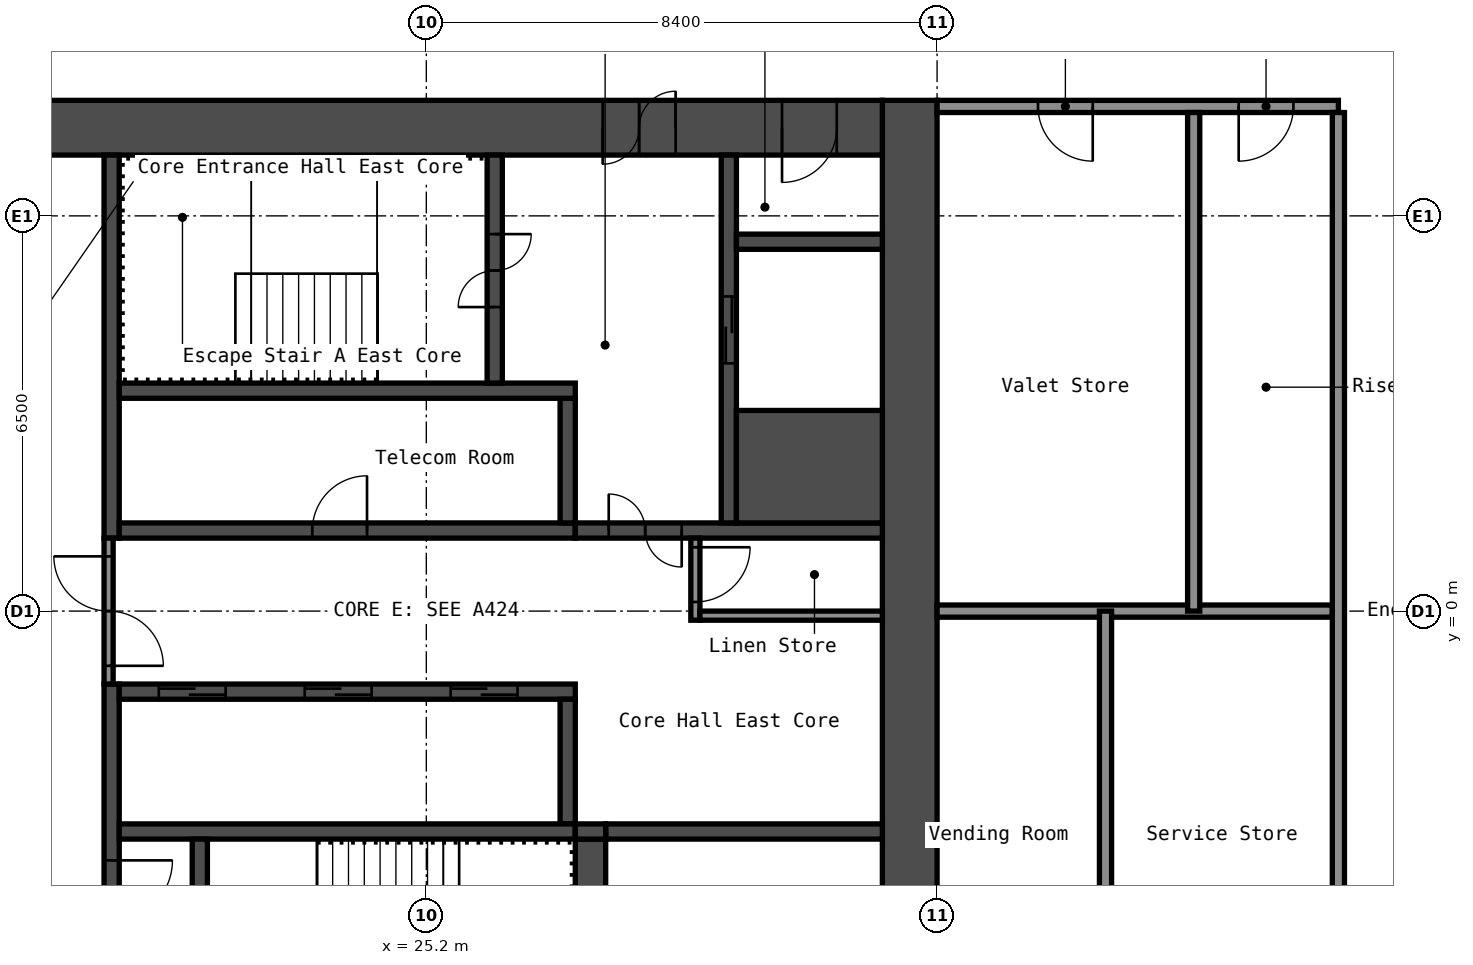
"""IFC4 building model, lengths in metres.
Left out: names, types, materials, properties, quantities, classifications, styles, units other than length and angle.
Written with IfcOpenShell. Run it as: python <this file> out.ifc"""

import sys

from ifc_helpers import new_model, si_unit, direction, frame, frame_2d, origin, place, context, subcontext, project, spatial, rectangle, extrude, element, fill, save


model = new_model("IFC4")
c1 = context("Model", 3, precision=1e-05, world=origin(), true_north=direction((0.0, 1.0)))
c2 = subcontext(c1, "Body", "Model", "MODEL_VIEW")
j1 = project(units=[si_unit("LENGTHUNIT", "METRE"), si_unit("PLANEANGLEUNIT", "RADIAN")], contexts=[c1])
p1 = place(None, origin())
s1 = spatial("IfcSite", under=j1, at=p1, CompositionType="ELEMENT")
p2 = place(p1, origin())
s2 = spatial("IfcBuilding", under=s1, at=p2, CompositionType="ELEMENT")
p3 = place(p2, frame((0.0, 0.0, 166.2)))
s3 = spatial("IfcBuildingStorey", under=s2, at=p3, CompositionType="ELEMENT", Elevation=166.2)
p4 = place(p3, frame((33.15, -8.4, 0.0), z_axis=(0.0, 0.0, 1.0), x_axis=(0.0, 1.0, 0.0)))
e1 = element("IfcWall", 1, at=p4, inside=s3, PredefinedType="SHEAR", context=c2, shape_type="SweptSolid", body=[
    extrude(rectangle(XDim=16.8, YDim=0.9, at=frame_2d((8.4, 0.0))), origin(), (0.0, 0.0, 1.0), 2.75),
])
p5 = place(p3, frame((17.7, 7.95, 0.0), z_axis=(0.0, 0.0, 1.0), x_axis=(1.0, 0.0, 0.0)))
e2 = element("IfcWall", 2, at=p5, inside=s3, PredefinedType="SHEAR", context=c2, shape_type="SweptSolid", body=[
    extrude(rectangle(XDim=15.0, YDim=0.9, at=frame_2d((7.5, 0.0))), origin(), (0.0, 0.0, 1.0), 2.75),
])
p6 = place(p5, frame((10.4, 0.0, 0.0)))
e3 = element("IfcOpeningElement", 3, at=p6, cuts=e2, PredefinedType="OPENING", context=c2, shape_type="SweptSolid", body=[
    extrude(rectangle(XDim=1.2, YDim=2.1, at=frame_2d((0.6, 1.05))), frame((0.0, 0.46, 0.0), z_axis=(0.0, -1.0, 0.0), x_axis=(1.0, 0.0, 0.0)), (0.0, 0.0, 1.0), 0.92),
])
p7 = place(p5, frame((13.35, 0.0, 0.0)))
e4 = element("IfcOpeningElement", 4, at=p7, cuts=e2, PredefinedType="OPENING", context=c2, shape_type="SweptSolid", body=[
    extrude(rectangle(XDim=0.9, YDim=2.1, at=frame_2d((0.45, 1.05))), frame((0.0, 0.46, 0.0), z_axis=(0.0, -1.0, 0.0), x_axis=(1.0, 0.0, 0.0)), (0.0, 0.0, 1.0), 0.92),
])
p8 = place(p3, frame((20.025, 1.2, 0.0), z_axis=(0.0, 0.0, 1.0), x_axis=(0.0, 1.0, 0.0)))
e5 = element("IfcWall", 5, at=p8, inside=s3, PredefinedType="SHEAR", context=c2, shape_type="SweptSolid", body=[
    extrude(rectangle(XDim=6.3, YDim=0.25, at=frame_2d((3.15, 0.0))), origin(), (0.0, 0.0, 1.0), 2.75),
])
p9 = place(p3, frame((20.025, -7.5, 0.0), z_axis=(0.0, 0.0, 1.0), x_axis=(0.0, 1.0, 0.0)))
e6 = element("IfcWall", 6, at=p9, inside=s3, PredefinedType="SHEAR", context=c2, shape_type="SweptSolid", body=[
    extrude(rectangle(XDim=6.3, YDim=0.25, at=frame_2d((3.15, 0.0))), origin(), (0.0, 0.0, 1.0), 2.75),
])
p10 = place(p9, frame((2.4, 0.0, 0.0)))
e7 = element("IfcOpeningElement", 7, at=p10, cuts=e6, PredefinedType="OPENING", context=c2, shape_type="SweptSolid", body=[
    extrude(rectangle(XDim=1.0, YDim=2.1, at=frame_2d((0.5, 1.05))), frame((0.0, 0.135, 0.0), z_axis=(0.0, -1.0, 0.0), x_axis=(1.0, 0.0, 0.0)), (0.0, 0.0, 1.0), 0.27),
])
p11 = place(p3, frame((20.15, 1.325, 0.0), z_axis=(0.0, 0.0, 1.0), x_axis=(1.0, 0.0, 0.0)))
e8 = element("IfcWall", 8, at=p11, inside=s3, PredefinedType="SHEAR", context=c2, shape_type="SweptSolid", body=[
    extrude(rectangle(XDim=7.5, YDim=0.25, at=frame_2d((3.75, 0.0))), origin(), (0.0, 0.0, 1.0), 2.75),
])
p12 = place(p11, frame((3.175, 0.0, 0.0)))
e9 = element("IfcOpeningElement", 9, at=p12, cuts=e8, PredefinedType="OPENING", context=c2, shape_type="SweptSolid", body=[
    extrude(rectangle(XDim=0.9, YDim=2.1, at=frame_2d((0.45, 1.05))), frame((0.0, 0.135, 0.0), z_axis=(0.0, -1.0, 0.0), x_axis=(1.0, 0.0, 0.0)), (0.0, 0.0, 1.0), 0.27),
])
p13 = place(p3, frame((27.525, 1.45, 0.0), z_axis=(0.0, 0.0, 1.0), x_axis=(0.0, 1.0, 0.0)))
e10 = element("IfcWall", 10, at=p13, inside=s3, PredefinedType="SHEAR", context=c2, shape_type="SweptSolid", body=[
    extrude(rectangle(XDim=2.05, YDim=0.25, at=frame_2d((1.025, 0.0))), origin(), (0.0, 0.0, 1.0), 2.75),
])
p14 = place(p3, frame((20.15, 3.625, 0.0), z_axis=(0.0, 0.0, 1.0), x_axis=(1.0, 0.0, 0.0)))
e11 = element("IfcWall", 11, at=p14, inside=s3, PredefinedType="SHEAR", context=c2, shape_type="SweptSolid", body=[
    extrude(rectangle(XDim=7.5, YDim=0.25, at=frame_2d((3.75, 0.0))), origin(), (0.0, 0.0, 1.0), 2.75),
])
p15 = place(p3, frame((26.325, 3.75, 0.0), z_axis=(0.0, 0.0, 1.0), x_axis=(0.0, 1.0, 0.0)))
e12 = element("IfcWall", 12, at=p15, inside=s3, PredefinedType="SHEAR", context=c2, shape_type="SweptSolid", body=[
    extrude(rectangle(XDim=3.75, YDim=0.25, at=frame_2d((1.875, 0.0))), origin(), (0.0, 0.0, 1.0), 2.75),
])
p16 = place(p15, frame((1.25, 0.0, 0.0)))
e13 = element("IfcOpeningElement", 13, at=p16, cuts=e12, PredefinedType="OPENING", context=c2, shape_type="SweptSolid", body=[
    extrude(rectangle(XDim=1.2, YDim=2.1, at=frame_2d((0.6, 1.05))), frame((0.0, 0.135, 0.0), z_axis=(0.0, -1.0, 0.0), x_axis=(1.0, 0.0, 0.0)), (0.0, 0.0, 1.0), 0.27),
])
p17 = place(p3, frame((27.65, 1.325, 0.0), z_axis=(0.0, 0.0, 1.0), x_axis=(1.0, 0.0, 0.0)))
e14 = element("IfcWall", 14, at=p17, inside=s3, PredefinedType="SHEAR", context=c2, shape_type="SweptSolid", body=[
    extrude(rectangle(XDim=5.05, YDim=0.25, at=frame_2d((2.525, 0.0))), origin(), (0.0, 0.0, 1.0), 2.75),
])
p18 = place(p17, frame((0.55, 0.0, 0.0)))
e15 = element("IfcOpeningElement", 15, at=p18, cuts=e14, PredefinedType="OPENING", context=c2, shape_type="SweptSolid", body=[
    extrude(rectangle(XDim=1.2, YDim=2.1, at=frame_2d((0.6, 1.05))), frame((0.0, 0.135, 0.0), z_axis=(0.0, -1.0, 0.0), x_axis=(1.0, 0.0, 0.0)), (0.0, 0.0, 1.0), 0.27),
])
p19 = place(p3, frame((30.175, 1.45, 0.0), z_axis=(0.0, 0.0, 1.0), x_axis=(0.0, 1.0, 0.0)))
e16 = element("IfcWall", 16, at=p19, inside=s3, PredefinedType="SHEAR", context=c2, shape_type="SweptSolid", body=[
    extrude(rectangle(XDim=6.05, YDim=0.25, at=frame_2d((3.025, 0.0))), origin(), (0.0, 0.0, 1.0), 2.75),
])
p20 = place(p19, frame((2.625, 0.0, 0.0)))
e17 = element("IfcOpeningElement", 17, at=p20, cuts=e16, PredefinedType="OPENING", context=c2, shape_type="SweptSolid", body=[
    extrude(rectangle(XDim=1.1, YDim=2.1, at=frame_2d((0.55, 1.05))), frame((0.0, 0.135, 0.0), z_axis=(0.0, -1.0, 0.0), x_axis=(1.0, 0.0, 0.0)), (0.0, 0.0, 1.0), 0.27),
])
p21 = place(p3, frame((30.3, 2.375, 0.0), z_axis=(0.0, 0.0, 1.0), x_axis=(1.0, 0.0, 0.0)))
e18 = element("IfcWall", 18, at=p21, inside=s3, PredefinedType="SHEAR", context=c2, shape_type="SweptSolid", body=[
    extrude(rectangle(XDim=2.4, YDim=1.85, at=frame_2d((1.2, 0.0))), origin(), (0.0, 0.0, 1.0), 2.75),
])
p22 = place(p3, frame((30.3, 6.075, 0.0), z_axis=(0.0, 0.0, 1.0), x_axis=(1.0, 0.0, 0.0)))
e19 = element("IfcWall", 19, at=p22, inside=s3, PredefinedType="SHEAR", context=c2, shape_type="SweptSolid", body=[
    extrude(rectangle(XDim=2.4, YDim=0.25, at=frame_2d((1.2, 0.0))), origin(), (0.0, 0.0, 1.0), 2.75),
])
p23 = place(p3, frame((20.15, -1.325, 0.0), z_axis=(0.0, 0.0, 1.0), x_axis=(1.0, 0.0, 0.0)))
e20 = element("IfcWall", 20, at=p23, inside=s3, PredefinedType="SHEAR", context=c2, shape_type="SweptSolid", body=[
    extrude(rectangle(XDim=7.5, YDim=0.25, at=frame_2d((3.75, 0.0))), origin(), (0.0, 0.0, 1.0), 2.75),
])
p24 = place(p23, frame((0.65, 0.0, 0.0)))
e21 = element("IfcOpeningElement", 21, at=p24, cuts=e20, PredefinedType="OPENING", context=c2, shape_type="SweptSolid", body=[
    extrude(rectangle(XDim=1.1, YDim=2.1, at=frame_2d((0.55, 1.05))), frame((0.0, 0.135, 0.0), z_axis=(0.0, -1.0, 0.0), x_axis=(1.0, 0.0, 0.0)), (0.0, 0.0, 1.0), 0.27),
])
p25 = place(p23, frame((3.05, 0.0, 0.0)))
e22 = element("IfcOpeningElement", 22, at=p25, cuts=e20, PredefinedType="OPENING", context=c2, shape_type="SweptSolid", body=[
    extrude(rectangle(XDim=1.1, YDim=2.1, at=frame_2d((0.55, 1.05))), frame((0.0, 0.135, 0.0), z_axis=(0.0, -1.0, 0.0), x_axis=(1.0, 0.0, 0.0)), (0.0, 0.0, 1.0), 0.27),
])
p26 = place(p23, frame((5.45, 0.0, 0.0)))
e23 = element("IfcOpeningElement", 23, at=p26, cuts=e20, PredefinedType="OPENING", context=c2, shape_type="SweptSolid", body=[
    extrude(rectangle(XDim=1.1, YDim=2.1, at=frame_2d((0.55, 1.05))), frame((0.0, 0.135, 0.0), z_axis=(0.0, -1.0, 0.0), x_axis=(1.0, 0.0, 0.0)), (0.0, 0.0, 1.0), 0.27),
])
p27 = place(p3, frame((27.525, -3.5, 0.0), z_axis=(0.0, 0.0, 1.0), x_axis=(0.0, 1.0, 0.0)))
e24 = element("IfcWall", 24, at=p27, inside=s3, PredefinedType="SHEAR", context=c2, shape_type="SweptSolid", body=[
    extrude(rectangle(XDim=2.05, YDim=0.25, at=frame_2d((1.025, 0.0))), origin(), (0.0, 0.0, 1.0), 2.75),
])
p28 = place(p3, frame((20.15, -3.625, 0.0), z_axis=(0.0, 0.0, 1.0), x_axis=(1.0, 0.0, 0.0)))
e25 = element("IfcWall", 25, at=p28, inside=s3, PredefinedType="SHEAR", context=c2, shape_type="SweptSolid", body=[
    extrude(rectangle(XDim=7.5, YDim=0.25, at=frame_2d((3.75, 0.0))), origin(), (0.0, 0.0, 1.0), 2.75),
])
p29 = place(p3, frame((21.475, -7.5, 0.0), z_axis=(0.0, 0.0, 1.0), x_axis=(0.0, 1.0, 0.0)))
e26 = element("IfcWall", 26, at=p29, inside=s3, PredefinedType="SHEAR", context=c2, shape_type="SweptSolid", body=[
    extrude(rectangle(XDim=3.75, YDim=0.25, at=frame_2d((1.875, 0.0))), origin(), (0.0, 0.0, 1.0), 2.75),
])
p30 = place(p29, frame((1.3, 0.0, 0.0)))
e27 = element("IfcOpeningElement", 27, at=p30, cuts=e26, PredefinedType="OPENING", context=c2, shape_type="SweptSolid", body=[
    extrude(rectangle(XDim=1.2, YDim=2.1, at=frame_2d((0.6, 1.05))), frame((0.0, 0.135, 0.0), z_axis=(0.0, -1.0, 0.0), x_axis=(1.0, 0.0, 0.0)), (0.0, 0.0, 1.0), 0.27),
])
p31 = place(p3, frame((27.9, -7.5, 0.0), z_axis=(0.0, 0.0, 1.0), x_axis=(0.0, 1.0, 0.0)))
e28 = element("IfcWall", 28, at=p31, inside=s3, PredefinedType="SHEAR", context=c2, shape_type="SweptSolid", body=[
    extrude(rectangle(XDim=3.75, YDim=0.5, at=frame_2d((1.875, 0.0))), origin(), (0.0, 0.0, 1.0), 2.75),
])
p32 = place(p3, frame((28.15, -3.625, 0.0), z_axis=(0.0, 0.0, 1.0), x_axis=(1.0, 0.0, 0.0)))
e29 = element("IfcWall", 29, at=p32, inside=s3, PredefinedType="SHEAR", context=c2, shape_type="SweptSolid", body=[
    extrude(rectangle(XDim=4.55, YDim=0.25, at=frame_2d((2.275, 0.0))), origin(), (0.0, 0.0, 1.0), 2.75),
])
p33 = place(p3, frame((27.65, -3.625, 0.0), z_axis=(0.0, 0.0, 1.0), x_axis=(1.0, 0.0, 0.0)))
e30 = element("IfcWall", 30, at=p33, inside=s3, PredefinedType="SHEAR", context=c2, shape_type="SweptSolid", body=[
    extrude(rectangle(XDim=0.5, YDim=0.25, at=frame_2d((0.25, 0.0))), origin(), (0.0, 0.0, 1.0), 2.75),
])
p34 = place(p3, frame((19.975, -1.2, 0.0), z_axis=(0.0, 0.0, 1.0), x_axis=(0.0, 1.0, 0.0)))
e31 = element("IfcWall", 31, at=p34, inside=s3, PredefinedType="PARTITIONING", context=c2, shape_type="SweptSolid", body=[
    extrude(rectangle(XDim=2.4, YDim=0.15, at=frame_2d((1.2, 0.0))), origin(), (0.0, 0.0, 1.0), 2.75),
])
p35 = place(p34, frame((0.3, 0.0, 0.0)))
e32 = element("IfcOpeningElement", 32, at=p35, cuts=e31, PredefinedType="OPENING", context=c2, shape_type="SweptSolid", body=[
    extrude(rectangle(XDim=1.8, YDim=2.1, at=frame_2d((0.9, 1.05))), frame((0.0, 0.085, 0.0), z_axis=(0.0, -1.0, 0.0), x_axis=(1.0, 0.0, 0.0)), (0.0, 0.0, 1.0), 0.17),
])
p36 = place(p3, frame((29.625, -0.15, 0.0), z_axis=(0.0, 0.0, 1.0), x_axis=(0.0, 1.0, 0.0)))
e33 = element("IfcWall", 33, at=p36, inside=s3, PredefinedType="PARTITIONING", context=c2, shape_type="SweptSolid", body=[
    extrude(rectangle(XDim=1.35, YDim=0.15, at=frame_2d((0.675, 0.0))), origin(), (0.0, 0.0, 1.0), 2.75),
])
p37 = place(p36, frame((0.3, 0.0, 0.0)))
e34 = element("IfcOpeningElement", 34, at=p37, cuts=e33, PredefinedType="OPENING", context=c2, shape_type="SweptSolid", body=[
    extrude(rectangle(XDim=0.9, YDim=2.1, at=frame_2d((0.45, 1.05))), frame((0.0, 0.085, 0.0), z_axis=(0.0, -1.0, 0.0), x_axis=(1.0, 0.0, 0.0)), (0.0, 0.0, 1.0), 0.17),
])
p38 = place(p3, frame((29.7, -0.075, 0.0), z_axis=(0.0, 0.0, 1.0), x_axis=(1.0, 0.0, 0.0)))
e35 = element("IfcWall", 35, at=p38, inside=s3, PredefinedType="PARTITIONING", context=c2, shape_type="SweptSolid", body=[
    extrude(rectangle(XDim=3.0, YDim=0.15, at=frame_2d((1.5, 0.0))), origin(), (0.0, 0.0, 1.0), 2.75),
])
p39 = place(p3, frame((33.6, 0.0, 0.0), z_axis=(0.0, 0.0, 1.0), x_axis=(1.0, 0.0, 0.0)))
e36 = element("IfcWall", 36, at=p39, inside=s3, PredefinedType="PARTITIONING", context=c2, shape_type="SweptSolid", body=[
    extrude(rectangle(XDim=6.5, YDim=0.2, at=frame_2d((3.25, 0.0))), origin(), (0.0, 0.0, 1.0), 2.75),
])
p40 = place(p3, frame((33.6, 8.3, 0.0), z_axis=(0.0, 0.0, 1.0), x_axis=(1.0, 0.0, 0.0)))
e37 = element("IfcWall", 37, at=p40, inside=s3, PredefinedType="PARTITIONING", context=c2, shape_type="SweptSolid", body=[
    extrude(rectangle(XDim=6.6, YDim=0.2, at=frame_2d((3.3, 0.0))), origin(), (0.0, 0.0, 1.0), 2.75),
])
p41 = place(p40, frame((1.66, 0.0, 0.0)))
e38 = element("IfcOpeningElement", 38, at=p41, cuts=e37, PredefinedType="OPENING", context=c2, shape_type="SweptSolid", body=[
    extrude(rectangle(XDim=0.9, YDim=2.1, at=frame_2d((0.45, 1.05))), frame((0.0, 0.11, 0.0), z_axis=(0.0, -1.0, 0.0), x_axis=(1.0, 0.0, 0.0)), (0.0, 0.0, 1.0), 0.22),
])
p42 = place(p40, frame((4.96, 0.0, 0.0)))
e39 = element("IfcOpeningElement", 39, at=p42, cuts=e37, PredefinedType="OPENING", context=c2, shape_type="SweptSolid", body=[
    extrude(rectangle(XDim=0.9, YDim=2.1, at=frame_2d((0.45, 1.05))), frame((0.0, 0.11, 0.0), z_axis=(0.0, -1.0, 0.0), x_axis=(1.0, 0.0, 0.0)), (0.0, 0.0, 1.0), 0.22),
])
for number, where, z_axis, x_axis in (
    (40, (36.37, -8.2, 0.0), (0.0, 0.0, 1.0), (0.0, 1.0, 0.0)),
    (41, (37.82, 0.0, 0.0), (0.0, 0.0, 1.0), (0.0, 1.0, 0.0)),
):
    element("IfcWall", number, at=place(p3, frame(where, z_axis=z_axis, x_axis=x_axis)), inside=s3, PredefinedType="PARTITIONING", context=c2, shape_type="SweptSolid", body=[
        extrude(rectangle(XDim=8.2, YDim=0.2, at=frame_2d((4.1, 0.0))), origin(), (0.0, 0.0, 1.0), 2.75),
    ])
p43 = place(p3, frame((40.2, -8.2, 0.0), z_axis=(0.0, 0.0, 1.0), x_axis=(0.0, 1.0, 0.0)))
e42 = element("IfcWall", 42, at=p43, inside=s3, PredefinedType="PARTITIONING", context=c2, shape_type="SweptSolid", body=[
    extrude(rectangle(XDim=16.4, YDim=0.2, at=frame_2d((8.2, 0.0))), origin(), (0.0, 0.0, 1.0), 2.75),
])
p44 = place(p6, origin())
e43 = element("IfcDoor", 43, at=p44, inside=s3, OperationType="DOUBLE_DOOR_SINGLE_SWING", PredefinedType="DOOR", context=c2, shape_type="SweptSolid", body=[
    extrude(rectangle(XDim=1.2, YDim=2.1, at=frame_2d((0.6, 1.05))), frame((0.0, 0.025, 0.0), z_axis=(0.0, -1.0, 0.0), x_axis=(1.0, 0.0, 0.0)), (0.0, 0.0, 1.0), 0.05),
])
fill(e3, e43)
p45 = place(p7, origin())
e44 = element("IfcDoor", 44, at=p45, inside=s3, OperationType="SINGLE_SWING_LEFT", PredefinedType="DOOR", context=c2, shape_type="SweptSolid", body=[
    extrude(rectangle(XDim=0.9, YDim=2.1, at=frame_2d((0.45, 1.05))), frame((0.0, 0.025, 0.0), z_axis=(0.0, -1.0, 0.0), x_axis=(1.0, 0.0, 0.0)), (0.0, 0.0, 1.0), 0.05),
])
fill(e4, e44)
p46 = place(p16, origin())
e45 = element("IfcDoor", 45, at=p46, inside=s3, OperationType="DOUBLE_DOOR_SINGLE_SWING", PredefinedType="DOOR", context=c2, shape_type="SweptSolid", body=[
    extrude(rectangle(XDim=1.2, YDim=2.1, at=frame_2d((0.6, 1.05))), frame((0.0, 0.025, 0.0), z_axis=(0.0, -1.0, 0.0), x_axis=(1.0, 0.0, 0.0)), (0.0, 0.0, 1.0), 0.05),
])
fill(e13, e45)
p47 = place(p10, origin())
e46 = element("IfcDoor", 46, at=p47, inside=s3, OperationType="SINGLE_SWING_RIGHT", PredefinedType="DOOR", context=c2, shape_type="SweptSolid", body=[
    extrude(rectangle(XDim=1.0, YDim=2.1, at=frame_2d((0.5, 1.05))), frame((0.0, 0.025, 0.0), z_axis=(0.0, -1.0, 0.0), x_axis=(1.0, 0.0, 0.0)), (0.0, 0.0, 1.0), 0.05),
])
fill(e7, e46)
p48 = place(p18, origin())
e47 = element("IfcDoor", 47, at=p48, inside=s3, OperationType="DOUBLE_DOOR_SINGLE_SWING", PredefinedType="DOOR", context=c2, shape_type="SweptSolid", body=[
    extrude(rectangle(XDim=1.2, YDim=2.1, at=frame_2d((0.6, 1.05))), frame((0.0, 0.025, 0.0), z_axis=(0.0, -1.0, 0.0), x_axis=(1.0, 0.0, 0.0)), (0.0, 0.0, 1.0), 0.05),
])
fill(e15, e47)
p49 = place(p35, origin())
e48 = element("IfcDoor", 48, at=p49, inside=s3, OperationType="DOUBLE_DOOR_SINGLE_SWING", PredefinedType="DOOR", context=c2, shape_type="SweptSolid", body=[
    extrude(rectangle(XDim=1.8, YDim=2.1, at=frame_2d((0.9, 1.05))), frame((0.0, 0.025, 0.0), z_axis=(0.0, -1.0, 0.0), x_axis=(1.0, 0.0, 0.0)), (0.0, 0.0, 1.0), 0.05),
])
fill(e32, e48)
p50 = place(p37, origin())
e49 = element("IfcDoor", 49, at=p50, inside=s3, OperationType="SINGLE_SWING_RIGHT", PredefinedType="DOOR", context=c2, shape_type="SweptSolid", body=[
    extrude(rectangle(XDim=0.9, YDim=2.1, at=frame_2d((0.45, 1.05))), frame((0.0, 0.025, 0.0), z_axis=(0.0, -1.0, 0.0), x_axis=(1.0, 0.0, 0.0)), (0.0, 0.0, 1.0), 0.05),
])
fill(e34, e49)
p51 = place(p12, origin())
e50 = element("IfcDoor", 50, at=p51, inside=s3, OperationType="SINGLE_SWING_LEFT", PredefinedType="DOOR", context=c2, shape_type="SweptSolid", body=[
    extrude(rectangle(XDim=0.9, YDim=2.1, at=frame_2d((0.45, 1.05))), frame((0.0, 0.025, 0.0), z_axis=(0.0, -1.0, 0.0), x_axis=(1.0, 0.0, 0.0)), (0.0, 0.0, 1.0), 0.05),
])
fill(e9, e50)
p52 = place(p24, origin())
e51 = element("IfcDoor", 51, at=p52, inside=s3, OperationType="DOUBLE_DOOR_SLIDING", PredefinedType="DOOR", context=c2, shape_type="SweptSolid", body=[
    extrude(rectangle(XDim=1.1, YDim=2.1, at=frame_2d((0.55, 1.05))), frame((0.0, 0.025, 0.0), z_axis=(0.0, -1.0, 0.0), x_axis=(1.0, 0.0, 0.0)), (0.0, 0.0, 1.0), 0.05),
])
fill(e21, e51)
p53 = place(p25, origin())
e52 = element("IfcDoor", 52, at=p53, inside=s3, OperationType="DOUBLE_DOOR_SLIDING", PredefinedType="DOOR", context=c2, shape_type="SweptSolid", body=[
    extrude(rectangle(XDim=1.1, YDim=2.1, at=frame_2d((0.55, 1.05))), frame((0.0, 0.025, 0.0), z_axis=(0.0, -1.0, 0.0), x_axis=(1.0, 0.0, 0.0)), (0.0, 0.0, 1.0), 0.05),
])
fill(e22, e52)
p54 = place(p26, origin())
e53 = element("IfcDoor", 53, at=p54, inside=s3, OperationType="DOUBLE_DOOR_SLIDING", PredefinedType="DOOR", context=c2, shape_type="SweptSolid", body=[
    extrude(rectangle(XDim=1.1, YDim=2.1, at=frame_2d((0.55, 1.05))), frame((0.0, 0.025, 0.0), z_axis=(0.0, -1.0, 0.0), x_axis=(1.0, 0.0, 0.0)), (0.0, 0.0, 1.0), 0.05),
])
fill(e23, e53)
p55 = place(p20, origin())
e54 = element("IfcDoor", 54, at=p55, inside=s3, OperationType="DOUBLE_DOOR_SLIDING", PredefinedType="DOOR", context=c2, shape_type="SweptSolid", body=[
    extrude(rectangle(XDim=1.1, YDim=2.1, at=frame_2d((0.55, 1.05))), frame((0.0, 0.025, 0.0), z_axis=(0.0, -1.0, 0.0), x_axis=(1.0, 0.0, 0.0)), (0.0, 0.0, 1.0), 0.05),
])
fill(e17, e54)
p56 = place(p41, origin())
e55 = element("IfcDoor", 55, at=p56, inside=s3, OperationType="SINGLE_SWING_RIGHT", PredefinedType="DOOR", context=c2, shape_type="SweptSolid", body=[
    extrude(rectangle(XDim=0.9, YDim=2.1, at=frame_2d((0.45, 1.05))), frame((0.0, 0.025, 0.0), z_axis=(0.0, -1.0, 0.0), x_axis=(1.0, 0.0, 0.0)), (0.0, 0.0, 1.0), 0.05),
])
fill(e38, e55)
p57 = place(p42, origin())
e56 = element("IfcDoor", 56, at=p57, inside=s3, OperationType="SINGLE_SWING_LEFT", PredefinedType="DOOR", context=c2, shape_type="SweptSolid", body=[
    extrude(rectangle(XDim=0.9, YDim=2.1, at=frame_2d((0.45, 1.05))), frame((0.0, 0.025, 0.0), z_axis=(0.0, -1.0, 0.0), x_axis=(1.0, 0.0, 0.0)), (0.0, 0.0, 1.0), 0.05),
])
fill(e39, e56)
save(model, sys.argv[1])
